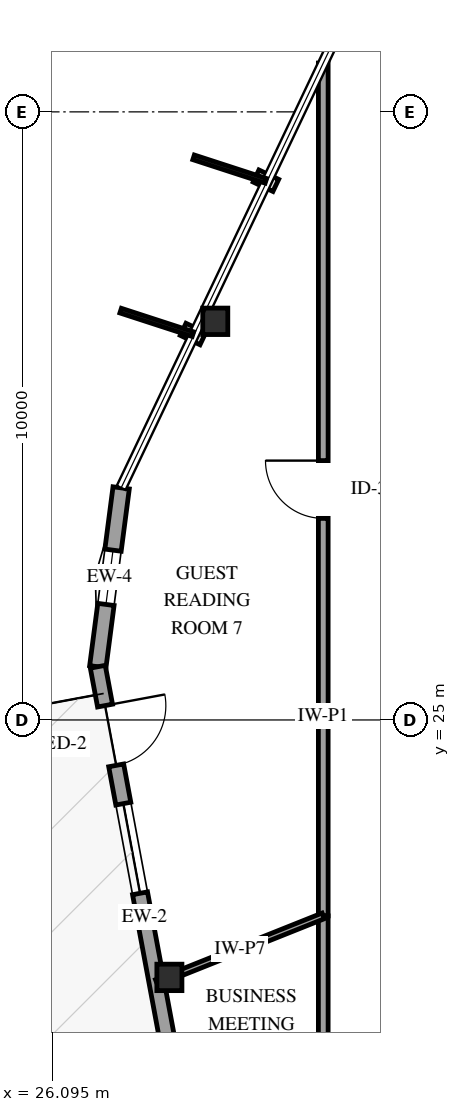
"""IFC4 building model, lengths in metres.
Left out: names, types, materials, properties, quantities, classifications, styles, units other than length and angle.
Written with IfcOpenShell. Run it as: python <this file> out.ifc"""

import sys

from ifc_helpers import new_model, si_unit, direction, frame, frame_2d, origin, origin_2d, place, context, subcontext, project, spatial, rectangle, i_section, extrude, element, fill, save


model = new_model("IFC4")
c1 = context("Model", 3, precision=1e-05, world=origin(), true_north=direction((0.0, 1.0)))
c2 = subcontext(c1, "Body", "Model", "MODEL_VIEW")
j1 = project(units=[si_unit("LENGTHUNIT", "METRE"), si_unit("PLANEANGLEUNIT", "RADIAN")], contexts=[c1])
p1 = place(None, origin())
s1 = spatial("IfcSite", under=j1, at=p1, CompositionType="ELEMENT")
p2 = place(p1, origin())
s2 = spatial("IfcBuilding", under=s1, at=p2, CompositionType="ELEMENT")
p3 = place(p2, frame((0.0, 0.0, 139.0)))
s3 = spatial("IfcBuildingStorey", under=s2, at=p3, CompositionType="ELEMENT", Elevation=139.0)
for number, where, z_axis, x_axis in (
    (1, (28.774, 31.556, -0.3), (0.0, 0.0, 1.0), (1.0, 0.0, 0.0)),
    (2, (28.02, 20.766, -0.3), (0.0, 0.0, 1.0), (1.0, 0.0, 0.0)),
):
    element("IfcColumn", number, at=place(p3, frame(where, z_axis=z_axis, x_axis=x_axis)), inside=s3, PredefinedType="COLUMN", context=c2, shape_type="SweptSolid", body=[
        extrude(i_section(OverallWidth=0.412, OverallDepth=0.435, WebThickness=0.036, FlangeThickness=0.057, FilletRadius=0.038, at=origin_2d()), origin(), (0.0, 0.0, 1.0), 3.9),
    ])
p4 = place(p3, frame((27.227, 28.817, 0.0), z_axis=(0.0, 0.0, 1.0), x_axis=(-0.129532682457, -0.991575153065, 0.0)))
e3 = element("IfcWall", 3, at=p4, inside=s3, PredefinedType="SOLIDWALL", context=c2, shape_type="SweptSolid", body=[
    extrude(rectangle(XDim=2.967, YDim=0.27, at=frame_2d((1.483, 0.0))), origin(), (0.0, 0.0, 1.0), 2.679),
])
p5 = place(p4, frame((1.033, 0.0, 0.75)))
e4 = element("IfcOpeningElement", 4, at=p5, cuts=e3, PredefinedType="OPENING", context=c2, shape_type="SweptSolid", body=[
    extrude(rectangle(XDim=0.9, YDim=1.5, at=frame_2d((0.45, 0.75))), frame((0.0, 0.145, 0.0), z_axis=(0.0, -1.0, 0.0), x_axis=(1.0, 0.0, 0.0)), (0.0, 0.0, 1.0), 0.29),
])
p6 = place(p3, frame((26.842, 25.875, 0.0), z_axis=(0.0, 0.0, 1.0), x_axis=(0.183274789928, -0.983061723076, 0.0)))
e5 = element("IfcWall", 5, at=p6, inside=s3, PredefinedType="SOLIDWALL", context=c2, shape_type="SweptSolid", body=[
    extrude(rectangle(XDim=8.376, YDim=0.25, at=frame_2d((4.188, 0.0))), origin(), (0.0, 0.0, 1.0), 2.679),
])
p7 = place(p6, frame((0.65, 0.0, 0.0)))
e6 = element("IfcOpeningElement", 6, at=p7, cuts=e5, PredefinedType="OPENING", context=c2, shape_type="SweptSolid", body=[
    extrude(rectangle(XDim=1.0, YDim=2.15, at=frame_2d((0.5, 1.075))), frame((0.0, 0.135, 0.0), z_axis=(0.0, -1.0, 0.0), x_axis=(1.0, 0.0, 0.0)), (0.0, 0.0, 1.0), 0.27),
])
p8 = place(p6, frame((2.29, 0.0, 0.72)))
e7 = element("IfcOpeningElement", 7, at=p8, cuts=e5, PredefinedType="OPENING", context=c2, shape_type="SweptSolid", body=[
    extrude(rectangle(XDim=1.5, YDim=1.7, at=frame_2d((0.75, 0.85))), frame((0.0, 0.135, 0.0), z_axis=(0.0, -1.0, 0.0), x_axis=(1.0, 0.0, 0.0)), (0.0, 0.0, 1.0), 0.27),
])
p9 = place(p3, frame((30.55, 21.778, 0.0), z_axis=(0.0, 0.0, 1.0), x_axis=(0.0, 1.0, 0.0)))
e8 = element("IfcWall", 8, at=p9, inside=s3, PredefinedType="PARTITIONING", context=c2, shape_type="SweptSolid", body=[
    extrude(rectangle(XDim=14.025, YDim=0.16, at=frame_2d((7.012, 0.0))), origin(), (0.0, 0.0, 1.0), 3.3),
])
p10 = place(p9, frame((6.537, 0.0, 0.0)))
e9 = element("IfcOpeningElement", 9, at=p10, cuts=e8, PredefinedType="OPENING", context=c2, shape_type="SweptSolid", body=[
    extrude(rectangle(XDim=0.95, YDim=2.15, at=frame_2d((0.475, 1.075))), frame((0.0, 0.09, 0.0), z_axis=(0.0, -1.0, 0.0), x_axis=(1.0, 0.0, 0.0)), (0.0, 0.0, 1.0), 0.18),
])
p11 = place(p3, frame((30.55, 14.321, 0.0), z_axis=(0.0, 0.0, 1.0), x_axis=(0.0, 1.0, 0.0)))
e10 = element("IfcWall", 10, at=p11, inside=s3, PredefinedType="PARTITIONING", context=c2, shape_type="SweptSolid", body=[
    extrude(rectangle(XDim=7.457, YDim=0.16, at=frame_2d((3.729, 0.0))), origin(), (0.0, 0.0, 1.0), 3.3),
])
p12 = place(p11, frame((3.253, 0.0, 0.0)))
e11 = element("IfcOpeningElement", 11, at=p12, cuts=e10, PredefinedType="OPENING", context=c2, shape_type="SweptSolid", body=[
    extrude(rectangle(XDim=0.95, YDim=2.15, at=frame_2d((0.475, 1.075))), frame((0.0, 0.09, 0.0), z_axis=(0.0, -1.0, 0.0), x_axis=(1.0, 0.0, 0.0)), (0.0, 0.0, 1.0), 0.18),
])
p13 = place(p3, frame((30.55, 21.778, 0.0), z_axis=(0.0, 0.0, 1.0), x_axis=(-0.928596473604, -0.371091079401, 0.0)))
e12 = element("IfcWall", 12, at=p13, inside=s3, PredefinedType="PARTITIONING", context=c2, shape_type="SweptSolid", body=[
    extrude(rectangle(XDim=2.951, YDim=0.1, at=frame_2d((1.475, 0.0))), origin(), (0.0, 0.0, 1.0), 3.3),
])
p14 = place(p5, origin())
e13 = element("IfcWindow", 13, at=p14, inside=s3, PartitioningType="SINGLE_PANEL", PredefinedType="WINDOW", context=c2, shape_type="SweptSolid", body=[
    extrude(rectangle(XDim=0.9, YDim=1.5, at=frame_2d((0.45, 0.75))), frame((0.0, 0.03, 0.0), z_axis=(0.0, -1.0, 0.0), x_axis=(1.0, 0.0, 0.0)), (0.0, 0.0, 1.0), 0.06),
])
fill(e4, e13)
p15 = place(p7, origin())
e14 = element("IfcDoor", 14, at=p15, inside=s3, OperationType="SINGLE_SWING_LEFT", PredefinedType="DOOR", context=c2, shape_type="SweptSolid", body=[
    extrude(rectangle(XDim=1.0, YDim=2.15, at=frame_2d((0.5, 1.075))), frame((0.0, 0.025, 0.0), z_axis=(0.0, -1.0, 0.0), x_axis=(1.0, 0.0, 0.0)), (0.0, 0.0, 1.0), 0.05),
])
fill(e6, e14)
p16 = place(p8, origin())
e15 = element("IfcWindow", 15, at=p16, inside=s3, PartitioningType="SINGLE_PANEL", PredefinedType="WINDOW", context=c2, shape_type="SweptSolid", body=[
    extrude(rectangle(XDim=1.5, YDim=1.7, at=frame_2d((0.75, 0.85))), frame((0.0, 0.03, 0.0), z_axis=(0.0, -1.0, 0.0), x_axis=(1.0, 0.0, 0.0)), (0.0, 0.0, 1.0), 0.06),
])
fill(e7, e15)
p17 = place(p10, origin())
e16 = element("IfcDoor", 16, at=p17, inside=s3, OperationType="SINGLE_SWING_RIGHT", PredefinedType="DOOR", context=c2, shape_type="SweptSolid", body=[
    extrude(rectangle(XDim=0.95, YDim=2.15, at=frame_2d((0.475, 1.075))), frame((0.0, 0.025, 0.0), z_axis=(0.0, -1.0, 0.0), x_axis=(1.0, 0.0, 0.0)), (0.0, 0.0, 1.0), 0.05),
])
fill(e9, e16)
save(model, sys.argv[1])
